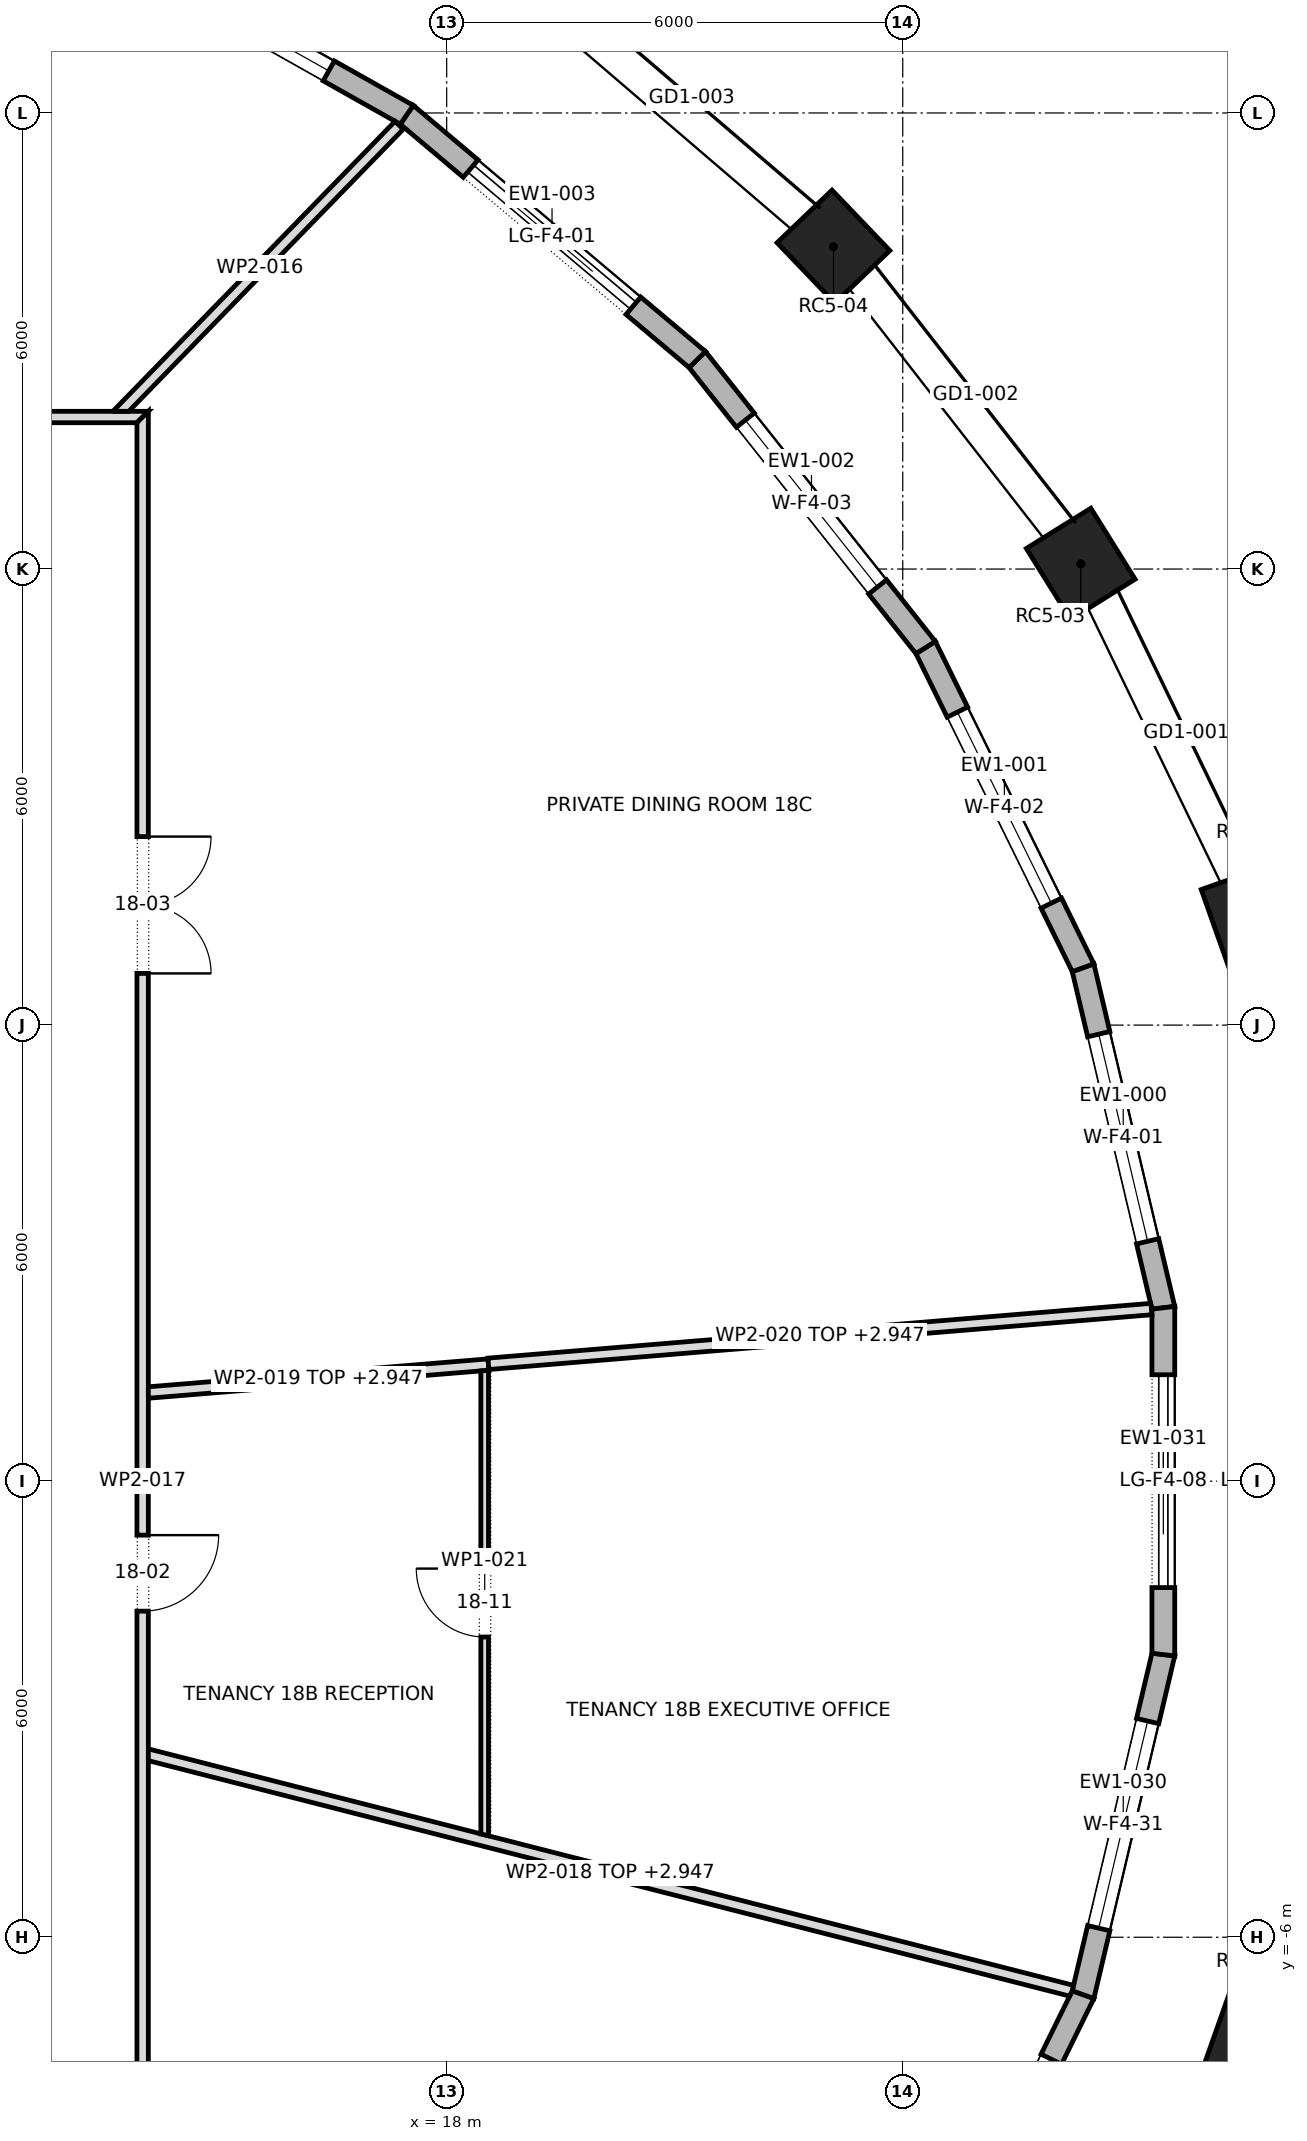
"""IFC4 building model, lengths in metres.
Left out: names, types, materials, properties, quantities, classifications, styles, units other than length and angle.
Written with IfcOpenShell. Run it as: python <this file> out.ifc"""

import sys

from ifc_helpers import new_model, si_unit, direction, frame, frame_2d, origin, origin_2d, place, context, subcontext, project, spatial, polyline, rectangle, outline, extrude, element, fill, save


model = new_model("IFC4")
c1 = context("Model", 3, precision=1e-05, world=origin(), true_north=direction((0.0, 1.0)))
c2 = subcontext(c1, "Body", "Model", "MODEL_VIEW")
j1 = project(units=[si_unit("LENGTHUNIT", "METRE"), si_unit("PLANEANGLEUNIT", "RADIAN")], contexts=[c1])
p1 = place(None, origin())
s1 = spatial("IfcSite", under=j1, at=p1, CompositionType="ELEMENT")
p2 = place(p1, origin())
s2 = spatial("IfcBuilding", under=s1, at=p2, CompositionType="ELEMENT")
p3 = place(p2, frame((0.0, 0.0, 264.3)))
s3 = spatial("IfcBuildingStorey", under=s2, at=p3, CompositionType="ELEMENT", Elevation=264.3)
for number, where, z_axis, x_axis in (
    (1, (28.582, 7.432, 0.0), (0.0, 0.0, 1.0), (-0.334, 0.943, 0.0)),
    (2, (26.342, 12.069, 0.0), (0.0, 0.0, 1.0), (-0.529, 0.849, 0.0)),
    (3, (23.089, 16.241, 0.0), (0.0, 0.0, 1.0), (-0.692, 0.722, 0.0)),
    (4, (28.582, -7.432, 0.0), (0.0, 0.0, 1.0), (0.334, 0.943, 0.0)),
):
    element("IfcColumn", number, at=place(p3, frame(where, z_axis=z_axis, x_axis=x_axis)), inside=s3, PredefinedType="COLUMN", context=c2, shape_type="SweptSolid", body=[
        extrude(rectangle(XDim=1.1, YDim=1.0, at=origin_2d()), origin(), (0.0, 0.0, 1.0), 4.0),
    ])
p4 = place(p3, frame((27.428, 2.281, 0.0), z_axis=(0.0, 0.0, 1.0), x_axis=(-0.229767529411, 0.973245540667, 0.0)))
e5 = element("IfcWall", 5, at=p4, inside=s3, PredefinedType="STANDARD", context=c2, shape_type="SweptSolid", body=[
    extrude(outline(polyline([(-0.018, -0.15), (4.614, -0.15), (4.58, 0.15), (0.018, 0.15), (-0.018, -0.15)])), origin(), (0.0, 0.0, 1.0), 3.7),
])
p5 = place(p4, frame((0.898, 0.0, 0.6)))
e6 = element("IfcOpeningElement", 6, at=p5, cuts=e5, PredefinedType="OPENING", context=c2, shape_type="SweptSolid", body=[
    extrude(rectangle(XDim=2.8, YDim=2.65, at=frame_2d((1.4, 1.325))), frame((0.0, 0.162, 0.0), z_axis=(0.0, -1.0, 0.0), x_axis=(1.0, 0.0, 0.0)), (0.0, 0.0, 1.0), 0.324),
])
p6 = place(p3, frame((26.372, 6.755, 0.0), z_axis=(0.0, 0.0, 1.0), x_axis=(-0.441169971308, 0.89742356578, 0.0)))
e7 = element("IfcWall", 7, at=p6, inside=s3, PredefinedType="STANDARD", context=c2, shape_type="SweptSolid", body=[
    extrude(outline(polyline([(-0.017, -0.15), (4.71, -0.15), (4.678, 0.15), (0.017, 0.15), (-0.017, -0.15)])), origin(), (0.0, 0.0, 1.0), 3.7),
])
p7 = place(p6, frame((0.947, 0.0, 0.6)))
e8 = element("IfcOpeningElement", 8, at=p7, cuts=e7, PredefinedType="OPENING", context=c2, shape_type="SweptSolid", body=[
    extrude(rectangle(XDim=2.8, YDim=2.65, at=frame_2d((1.4, 1.325))), frame((0.0, 0.162, 0.0), z_axis=(0.0, -1.0, 0.0), x_axis=(1.0, 0.0, 0.0)), (0.0, 0.0, 1.0), 0.324),
])
p8 = place(p3, frame((24.302, 10.967, 0.0), z_axis=(0.0, 0.0, 1.0), x_axis=(-0.621358373565, 0.783526497063, 0.0)))
e9 = element("IfcWall", 9, at=p8, inside=s3, PredefinedType="STANDARD", context=c2, shape_type="SweptSolid", body=[
    extrude(outline(polyline([(-0.016, -0.15), (4.851, -0.15), (4.821, 0.15), (0.016, 0.15), (-0.016, -0.15)])), origin(), (0.0, 0.0, 1.0), 3.7),
])
p9 = place(p8, frame((1.018, 0.0, 0.6)))
e10 = element("IfcOpeningElement", 10, at=p9, cuts=e9, PredefinedType="OPENING", context=c2, shape_type="SweptSolid", body=[
    extrude(rectangle(XDim=2.8, YDim=2.65, at=frame_2d((1.4, 1.325))), frame((0.0, 0.162, 0.0), z_axis=(0.0, -1.0, 0.0), x_axis=(1.0, 0.0, 0.0)), (0.0, 0.0, 1.0), 0.324),
])
p10 = place(p3, frame((21.297, 14.756, 0.0), z_axis=(0.0, 0.0, 1.0), x_axis=(-0.764746492461, 0.644331283013, 0.0)))
e11 = element("IfcWall", 11, at=p10, inside=s3, PredefinedType="STANDARD", context=c2, shape_type="SweptSolid", body=[
    extrude(outline(polyline([(-0.015, -0.15), (5.012, -0.15), (4.984, 0.15), (0.015, 0.15), (-0.015, -0.15)])), origin(), (0.0, 0.0, 1.0), 3.7),
])
p11 = place(p10, frame((1.099, 0.0, 0.0)))
e12 = element("IfcOpeningElement", 12, at=p11, cuts=e11, PredefinedType="OPENING", context=c2, shape_type="SweptSolid", body=[
    extrude(rectangle(XDim=2.8, YDim=3.25, at=frame_2d((1.4, 1.625))), frame((0.0, 0.162, 0.0), z_axis=(0.0, -1.0, 0.0), x_axis=(1.0, 0.0, 0.0)), (0.0, 0.0, 1.0), 0.324),
])
p12 = place(p3, frame((17.475, 17.976, 0.0), z_axis=(0.0, 0.0, 1.0), x_axis=(-0.871411047742, 0.490553550465, 0.0)))
e13 = element("IfcWall", 13, at=p12, inside=s3, PredefinedType="STANDARD", context=c2, shape_type="SweptSolid", body=[
    extrude(outline(polyline([(-0.014, -0.15), (5.168, -0.15), (5.141, 0.15), (0.014, 0.15), (-0.014, -0.15)])), origin(), (0.0, 0.0, 1.0), 3.7),
])
p13 = place(p12, frame((1.177, 0.0, 0.6)))
e14 = element("IfcOpeningElement", 14, at=p13, cuts=e13, PredefinedType="OPENING", context=c2, shape_type="SweptSolid", body=[
    extrude(rectangle(XDim=2.8, YDim=2.65, at=frame_2d((1.4, 1.325))), frame((0.0, 0.162, 0.0), z_axis=(0.0, -1.0, 0.0), x_axis=(1.0, 0.0, 0.0)), (0.0, 0.0, 1.0), 0.324),
])
p14 = place(p3, frame((24.302, -10.967, 0.0), z_axis=(0.0, 0.0, 1.0), x_axis=(0.441169971308, 0.89742356578, 0.0)))
e15 = element("IfcWall", 15, at=p14, inside=s3, PredefinedType="STANDARD", context=c2, shape_type="SweptSolid", body=[
    extrude(outline(polyline([(-0.016, -0.15), (4.711, -0.15), (4.677, 0.15), (0.016, 0.15), (-0.016, -0.15)])), origin(), (0.0, 0.0, 1.0), 3.7),
])
p15 = place(p14, frame((0.947, 0.0, 0.6)))
e16 = element("IfcOpeningElement", 16, at=p15, cuts=e15, PredefinedType="OPENING", context=c2, shape_type="SweptSolid", body=[
    extrude(rectangle(XDim=2.8, YDim=2.65, at=frame_2d((1.4, 1.325))), frame((0.0, 0.162, 0.0), z_axis=(0.0, -1.0, 0.0), x_axis=(1.0, 0.0, 0.0)), (0.0, 0.0, 1.0), 0.324),
])
p16 = place(p3, frame((26.372, -6.755, 0.0), z_axis=(0.0, 0.0, 1.0), x_axis=(0.229767529411, 0.973245540667, 0.0)))
e17 = element("IfcWall", 17, at=p16, inside=s3, PredefinedType="STANDARD", context=c2, shape_type="SweptSolid", body=[
    extrude(outline(polyline([(-0.017, -0.15), (4.614, -0.15), (4.579, 0.15), (0.017, 0.15), (-0.017, -0.15)])), origin(), (0.0, 0.0, 1.0), 3.7),
])
p17 = place(p16, frame((0.898, 0.0, 0.6)))
e18 = element("IfcOpeningElement", 18, at=p17, cuts=e17, PredefinedType="OPENING", context=c2, shape_type="SweptSolid", body=[
    extrude(rectangle(XDim=2.8, YDim=2.65, at=frame_2d((1.4, 1.325))), frame((0.0, 0.162, 0.0), z_axis=(0.0, -1.0, 0.0), x_axis=(1.0, 0.0, 0.0)), (0.0, 0.0, 1.0), 0.324),
])
p18 = place(p3, frame((27.428, -2.281, 0.0), z_axis=(0.0, 0.0, 1.0), x_axis=(0.0, 1.0, 0.0)))
e19 = element("IfcWall", 19, at=p18, inside=s3, PredefinedType="STANDARD", context=c2, shape_type="SweptSolid", body=[
    extrude(outline(polyline([(-0.018, -0.15), (4.58, -0.15), (4.545, 0.15), (0.018, 0.15), (-0.018, -0.15)])), origin(), (0.0, 0.0, 1.0), 3.7),
])
p19 = place(p18, frame((0.881, 0.0, 0.0)))
e20 = element("IfcOpeningElement", 20, at=p19, cuts=e19, PredefinedType="OPENING", context=c2, shape_type="SweptSolid", body=[
    extrude(rectangle(XDim=2.8, YDim=3.25, at=frame_2d((1.4, 1.625))), frame((0.0, 0.162, 0.0), z_axis=(0.0, -1.0, 0.0), x_axis=(1.0, 0.0, 0.0)), (0.0, 0.0, 1.0), 0.324),
])
p20 = place(p3, frame((-14.075, 14.0, 0.0), z_axis=(0.0, 0.0, 1.0), x_axis=(1.0, 0.0, 0.0)))
e21 = element("IfcWall", 21, at=p20, inside=s3, PredefinedType="PARTITIONING", context=c2, shape_type="SweptSolid", body=[
    extrude(outline(polyline([(0.15, -0.075), (2.139, -0.075), (4.128, -0.075), (6.118, -0.075), (8.107, -0.075), (10.096, -0.075), (12.086, -0.075), (14.075, -0.075), (16.064, -0.075), (18.053, -0.075), (20.043, -0.075), (22.032, -0.075), (24.021, -0.075), (26.011, -0.075), (28.0, -0.075), (28.15, 0.075), (26.273, 0.075), (24.396, 0.075), (22.52, 0.075), (20.643, 0.075), (18.767, 0.075), (16.89, 0.075), (15.013, 0.075), (13.137, 0.075), (11.26, 0.075), (9.383, 0.075), (7.507, 0.075), (5.63, 0.075), (3.753, 0.075), (1.877, 0.075), (0.0, 0.075), (0.15, -0.075)])), origin(), (0.0, 0.0, 1.0), 3.7),
])
p21 = place(p20, frame((22.915, 0.0, 0.0)))
e22 = element("IfcOpeningElement", 22, at=p21, cuts=e21, PredefinedType="OPENING", context=c2, shape_type="SweptSolid", body=[
    extrude(rectangle(XDim=1.0, YDim=2.1, at=frame_2d((0.5, 1.05))), frame((0.0, 0.087, 0.0), z_axis=(0.0, -1.0, 0.0), x_axis=(1.0, 0.0, 0.0)), (0.0, 0.0, 1.0), 0.174),
])
p22 = place(p20, frame((15.275, 0.0, 0.0)))
e23 = element("IfcOpeningElement", 23, at=p22, cuts=e21, PredefinedType="OPENING", context=c2, shape_type="SweptSolid", body=[
    extrude(rectangle(XDim=1.0, YDim=2.1, at=frame_2d((0.5, 1.05))), frame((0.0, 0.087, 0.0), z_axis=(0.0, -1.0, 0.0), x_axis=(1.0, 0.0, 0.0)), (0.0, 0.0, 1.0), 0.174),
])
p23 = place(p20, frame((5.355, 0.0, 0.0)))
e24 = element("IfcOpeningElement", 24, at=p23, cuts=e21, PredefinedType="OPENING", context=c2, shape_type="SweptSolid", body=[
    extrude(rectangle(XDim=1.8, YDim=2.1, at=frame_2d((0.9, 1.05))), frame((0.0, 0.087, 0.0), z_axis=(0.0, -1.0, 0.0), x_axis=(1.0, 0.0, 0.0)), (0.0, 0.0, 1.0), 0.174),
])
p24 = place(p3, frame((13.662, 14.023, 0.0), z_axis=(0.0, 0.0, 1.0), x_axis=(0.697340314613, 0.716740179992, 0.0)))
e25 = element("IfcWall", 25, at=p24, inside=s3, PredefinedType="PARTITIONING", context=c2, shape_type="SweptSolid", body=[
    extrude(outline(polyline([(0.0, 0.075), (0.0, 0.075), (0.146, -0.075), (1.871, -0.075), (3.597, -0.075), (5.323, -0.075), (5.323, 0.075), (3.549, 0.075), (1.774, 0.075), (0.0, 0.075)])), origin(), (0.0, 0.0, 1.0), 3.7),
])
p25 = place(p3, frame((14.0, -14.075, 0.0), z_axis=(0.0, 0.0, 1.0), x_axis=(0.0, 1.0, 0.0)))
e26 = element("IfcWall", 26, at=p25, inside=s3, PredefinedType="PARTITIONING", context=c2, shape_type="SweptSolid", body=[
    extrude(outline(polyline([(0.0, -0.075), (1.877, -0.075), (3.753, -0.075), (5.63, -0.075), (7.507, -0.075), (9.383, -0.075), (11.26, -0.075), (13.137, -0.075), (15.013, -0.075), (16.89, -0.075), (18.767, -0.075), (20.643, -0.075), (22.52, -0.075), (24.396, -0.075), (26.273, -0.075), (28.15, -0.075), (28.0, 0.075), (26.011, 0.075), (24.021, 0.075), (22.032, 0.075), (20.043, 0.075), (18.053, 0.075), (16.064, 0.075), (14.075, 0.075), (12.086, 0.075), (10.096, 0.075), (8.107, 0.075), (6.118, 0.075), (4.128, 0.075), (2.139, 0.075), (0.15, 0.075), (0.0, -0.075)])), origin(), (0.0, 0.0, 1.0), 3.7),
])
p26 = place(p25, frame((12.365, 0.0, 0.0)))
e27 = element("IfcOpeningElement", 27, at=p26, cuts=e26, PredefinedType="OPENING", context=c2, shape_type="SweptSolid", body=[
    extrude(rectangle(XDim=1.0, YDim=2.1, at=frame_2d((0.5, 1.05))), frame((0.0, 0.087, 0.0), z_axis=(0.0, -1.0, 0.0), x_axis=(1.0, 0.0, 0.0)), (0.0, 0.0, 1.0), 0.174),
])
p27 = place(p25, frame((20.755, 0.0, 0.0)))
e28 = element("IfcOpeningElement", 28, at=p27, cuts=e26, PredefinedType="OPENING", context=c2, shape_type="SweptSolid", body=[
    extrude(rectangle(XDim=1.8, YDim=2.1, at=frame_2d((0.9, 1.05))), frame((0.0, 0.087, 0.0), z_axis=(0.0, -1.0, 0.0), x_axis=(1.0, 0.0, 0.0)), (0.0, 0.0, 1.0), 0.174),
])
p28 = place(p3, frame((14.057, -3.594, 0.0), z_axis=(0.0, 0.0, 1.0), x_axis=(0.968853358083, -0.24763515609, 0.0)))
e29 = element("IfcWall", 29, at=p28, inside=s3, PredefinedType="PARTITIONING", context=c2, shape_type="SweptSolid", body=[
    extrude(outline(polyline([(0.038, -0.075), (1.825, -0.075), (3.613, -0.075), (5.4, -0.075), (7.187, -0.075), (8.974, -0.075), (10.761, -0.075), (12.548, -0.075), (12.563, -0.004), (12.563, 0.066), (12.563, 0.075), (10.768, 0.075), (8.974, 0.075), (7.179, 0.075), (5.384, 0.075), (3.589, 0.075), (1.795, 0.075), (0.0, 0.075), (0.0, 0.074), (0.038, -0.075)])), origin(), (0.0, 0.0, 1.0), 2.947),
])
p29 = place(p3, frame((14.069, 1.166, 0.0), z_axis=(0.0, 0.0, 1.0), x_axis=(0.996636539938, 0.081948808782, 0.0)))
e30 = element("IfcWall", 30, at=p29, inside=s3, PredefinedType="PARTITIONING", context=c2, shape_type="SweptSolid", body=[
    extrude(outline(polyline([(4.496, -0.075), (4.496, -0.003), (4.496, 0.075), (3.001, 0.075), (1.506, 0.075), (0.012, 0.075), (0.0, -0.069), (0.0, -0.075), (1.499, -0.075), (2.997, -0.075), (4.496, -0.075)])), origin(), (0.0, 0.0, 1.0), 2.947),
])
p30 = place(p3, frame((18.549, 1.544, 0.0), z_axis=(0.0, 0.0, 1.0), x_axis=(0.996604371019, 0.082339101686, 0.0)))
e31 = element("IfcWall", 31, at=p30, inside=s3, PredefinedType="PARTITIONING", context=c2, shape_type="SweptSolid", body=[
    extrude(outline(polyline([(8.753, -0.075), (8.753, 0.039), (8.748, 0.075), (6.998, 0.075), (5.249, 0.075), (3.499, 0.075), (1.75, 0.075), (0.0, 0.075), (0.0, -0.075), (1.75, -0.075), (3.501, -0.075), (5.252, -0.075), (7.002, -0.075), (8.753, -0.075)])), origin(), (0.0, 0.0, 1.0), 2.947),
])
p31 = place(p3, frame((18.5, 1.458, 0.0), z_axis=(0.0, 0.0, 1.0), x_axis=(0.0, -1.0, 0.0)))
e32 = element("IfcWall", 32, at=p31, inside=s3, PredefinedType="PARTITIONING", context=c2, shape_type="SweptSolid", body=[
    extrude(outline(polyline([(0.008, -0.05), (1.531, -0.05), (3.053, -0.05), (4.576, -0.05), (6.098, -0.05), (6.124, 0.05), (6.124, 0.05), (4.593, 0.05), (3.062, 0.05), (1.531, 0.05), (0.0, 0.05), (0.0, 0.046), (0.008, -0.05)])), origin(), (0.0, 0.0, 1.0), 3.7),
])
p32 = place(p31, frame((2.608, 0.0, 0.0)))
e33 = element("IfcOpeningElement", 33, at=p32, cuts=e32, PredefinedType="OPENING", context=c2, shape_type="SweptSolid", body=[
    extrude(rectangle(XDim=0.9, YDim=2.1, at=frame_2d((0.45, 1.05))), frame((0.0, 0.062, 0.0), z_axis=(0.0, -1.0, 0.0), x_axis=(1.0, 0.0, 0.0)), (0.0, 0.0, 1.0), 0.124),
])
p33 = place(p5, origin())
e34 = element("IfcWindow", 34, at=p33, inside=s3, PartitioningType="DOUBLE_PANEL_VERTICAL", PredefinedType="WINDOW", context=c2, shape_type="SweptSolid", body=[
    extrude(rectangle(XDim=2.8, YDim=2.65, at=frame_2d((1.4, 1.325))), frame((0.0, 0.03, 0.0), z_axis=(0.0, -1.0, 0.0), x_axis=(1.0, 0.0, 0.0)), (0.0, 0.0, 1.0), 0.06),
])
fill(e6, e34)
p34 = place(p7, origin())
e35 = element("IfcWindow", 35, at=p34, inside=s3, PartitioningType="DOUBLE_PANEL_VERTICAL", PredefinedType="WINDOW", context=c2, shape_type="SweptSolid", body=[
    extrude(rectangle(XDim=2.8, YDim=2.65, at=frame_2d((1.4, 1.325))), frame((0.0, 0.03, 0.0), z_axis=(0.0, -1.0, 0.0), x_axis=(1.0, 0.0, 0.0)), (0.0, 0.0, 1.0), 0.06),
])
fill(e8, e35)
p35 = place(p9, origin())
e36 = element("IfcWindow", 36, at=p35, inside=s3, PartitioningType="DOUBLE_PANEL_VERTICAL", PredefinedType="WINDOW", context=c2, shape_type="SweptSolid", body=[
    extrude(rectangle(XDim=2.8, YDim=2.65, at=frame_2d((1.4, 1.325))), frame((0.0, 0.03, 0.0), z_axis=(0.0, -1.0, 0.0), x_axis=(1.0, 0.0, 0.0)), (0.0, 0.0, 1.0), 0.06),
])
fill(e10, e36)
p36 = place(p11, origin())
e37 = element("IfcDoor", 37, at=p36, inside=s3, OperationType="DOUBLE_DOOR_SLIDING", PredefinedType="DOOR", context=c2, shape_type="SweptSolid", body=[
    extrude(rectangle(XDim=2.8, YDim=3.25, at=frame_2d((1.4, 1.625))), frame((0.0, 0.025, 0.0), z_axis=(0.0, -1.0, 0.0), x_axis=(1.0, 0.0, 0.0)), (0.0, 0.0, 1.0), 0.05),
])
fill(e12, e37)
p37 = place(p13, origin())
e38 = element("IfcWindow", 38, at=p37, inside=s3, PartitioningType="DOUBLE_PANEL_VERTICAL", PredefinedType="WINDOW", context=c2, shape_type="SweptSolid", body=[
    extrude(rectangle(XDim=2.8, YDim=2.65, at=frame_2d((1.4, 1.325))), frame((0.0, 0.03, 0.0), z_axis=(0.0, -1.0, 0.0), x_axis=(1.0, 0.0, 0.0)), (0.0, 0.0, 1.0), 0.06),
])
fill(e14, e38)
p38 = place(p15, origin())
e39 = element("IfcWindow", 39, at=p38, inside=s3, PartitioningType="DOUBLE_PANEL_VERTICAL", PredefinedType="WINDOW", context=c2, shape_type="SweptSolid", body=[
    extrude(rectangle(XDim=2.8, YDim=2.65, at=frame_2d((1.4, 1.325))), frame((0.0, 0.03, 0.0), z_axis=(0.0, -1.0, 0.0), x_axis=(1.0, 0.0, 0.0)), (0.0, 0.0, 1.0), 0.06),
])
fill(e16, e39)
p39 = place(p17, origin())
e40 = element("IfcWindow", 40, at=p39, inside=s3, PartitioningType="DOUBLE_PANEL_VERTICAL", PredefinedType="WINDOW", context=c2, shape_type="SweptSolid", body=[
    extrude(rectangle(XDim=2.8, YDim=2.65, at=frame_2d((1.4, 1.325))), frame((0.0, 0.03, 0.0), z_axis=(0.0, -1.0, 0.0), x_axis=(1.0, 0.0, 0.0)), (0.0, 0.0, 1.0), 0.06),
])
fill(e18, e40)
p40 = place(p19, origin())
e41 = element("IfcDoor", 41, at=p40, inside=s3, OperationType="DOUBLE_DOOR_SLIDING", PredefinedType="DOOR", context=c2, shape_type="SweptSolid", body=[
    extrude(rectangle(XDim=2.8, YDim=3.25, at=frame_2d((1.4, 1.625))), frame((0.0, 0.025, 0.0), z_axis=(0.0, -1.0, 0.0), x_axis=(1.0, 0.0, 0.0)), (0.0, 0.0, 1.0), 0.05),
])
fill(e20, e41)
p41 = place(p26, frame((1.0, 0.0, 0.0), z_axis=(0.0, 0.0, 1.0), x_axis=(-1.0, 0.0, 0.0)))
e42 = element("IfcDoor", 42, at=p41, inside=s3, OperationType="SINGLE_SWING_RIGHT", PredefinedType="DOOR", context=c2, shape_type="SweptSolid", body=[
    extrude(rectangle(XDim=1.0, YDim=2.1, at=frame_2d((0.5, 1.05))), frame((0.0, 0.025, 0.0), z_axis=(0.0, -1.0, 0.0), x_axis=(1.0, 0.0, 0.0)), (0.0, 0.0, 1.0), 0.05),
])
fill(e27, e42)
p42 = place(p27, frame((1.8, 0.0, 0.0), z_axis=(0.0, 0.0, 1.0), x_axis=(-1.0, 0.0, 0.0)))
e43 = element("IfcDoor", 43, at=p42, inside=s3, OperationType="DOUBLE_DOOR_SINGLE_SWING", PredefinedType="DOOR", context=c2, shape_type="SweptSolid", body=[
    extrude(rectangle(XDim=1.8, YDim=2.1, at=frame_2d((0.9, 1.05))), frame((0.0, 0.025, 0.0), z_axis=(0.0, -1.0, 0.0), x_axis=(1.0, 0.0, 0.0)), (0.0, 0.0, 1.0), 0.05),
])
fill(e28, e43)
p43 = place(p32, frame((0.9, 0.0, 0.0), z_axis=(0.0, 0.0, 1.0), x_axis=(-1.0, 0.0, 0.0)))
e44 = element("IfcDoor", 44, at=p43, inside=s3, OperationType="SINGLE_SWING_LEFT", PredefinedType="DOOR", context=c2, shape_type="SweptSolid", body=[
    extrude(rectangle(XDim=0.9, YDim=2.1, at=frame_2d((0.45, 1.05))), frame((0.0, 0.025, 0.0), z_axis=(0.0, -1.0, 0.0), x_axis=(1.0, 0.0, 0.0)), (0.0, 0.0, 1.0), 0.05),
])
fill(e33, e44)
save(model, sys.argv[1])
